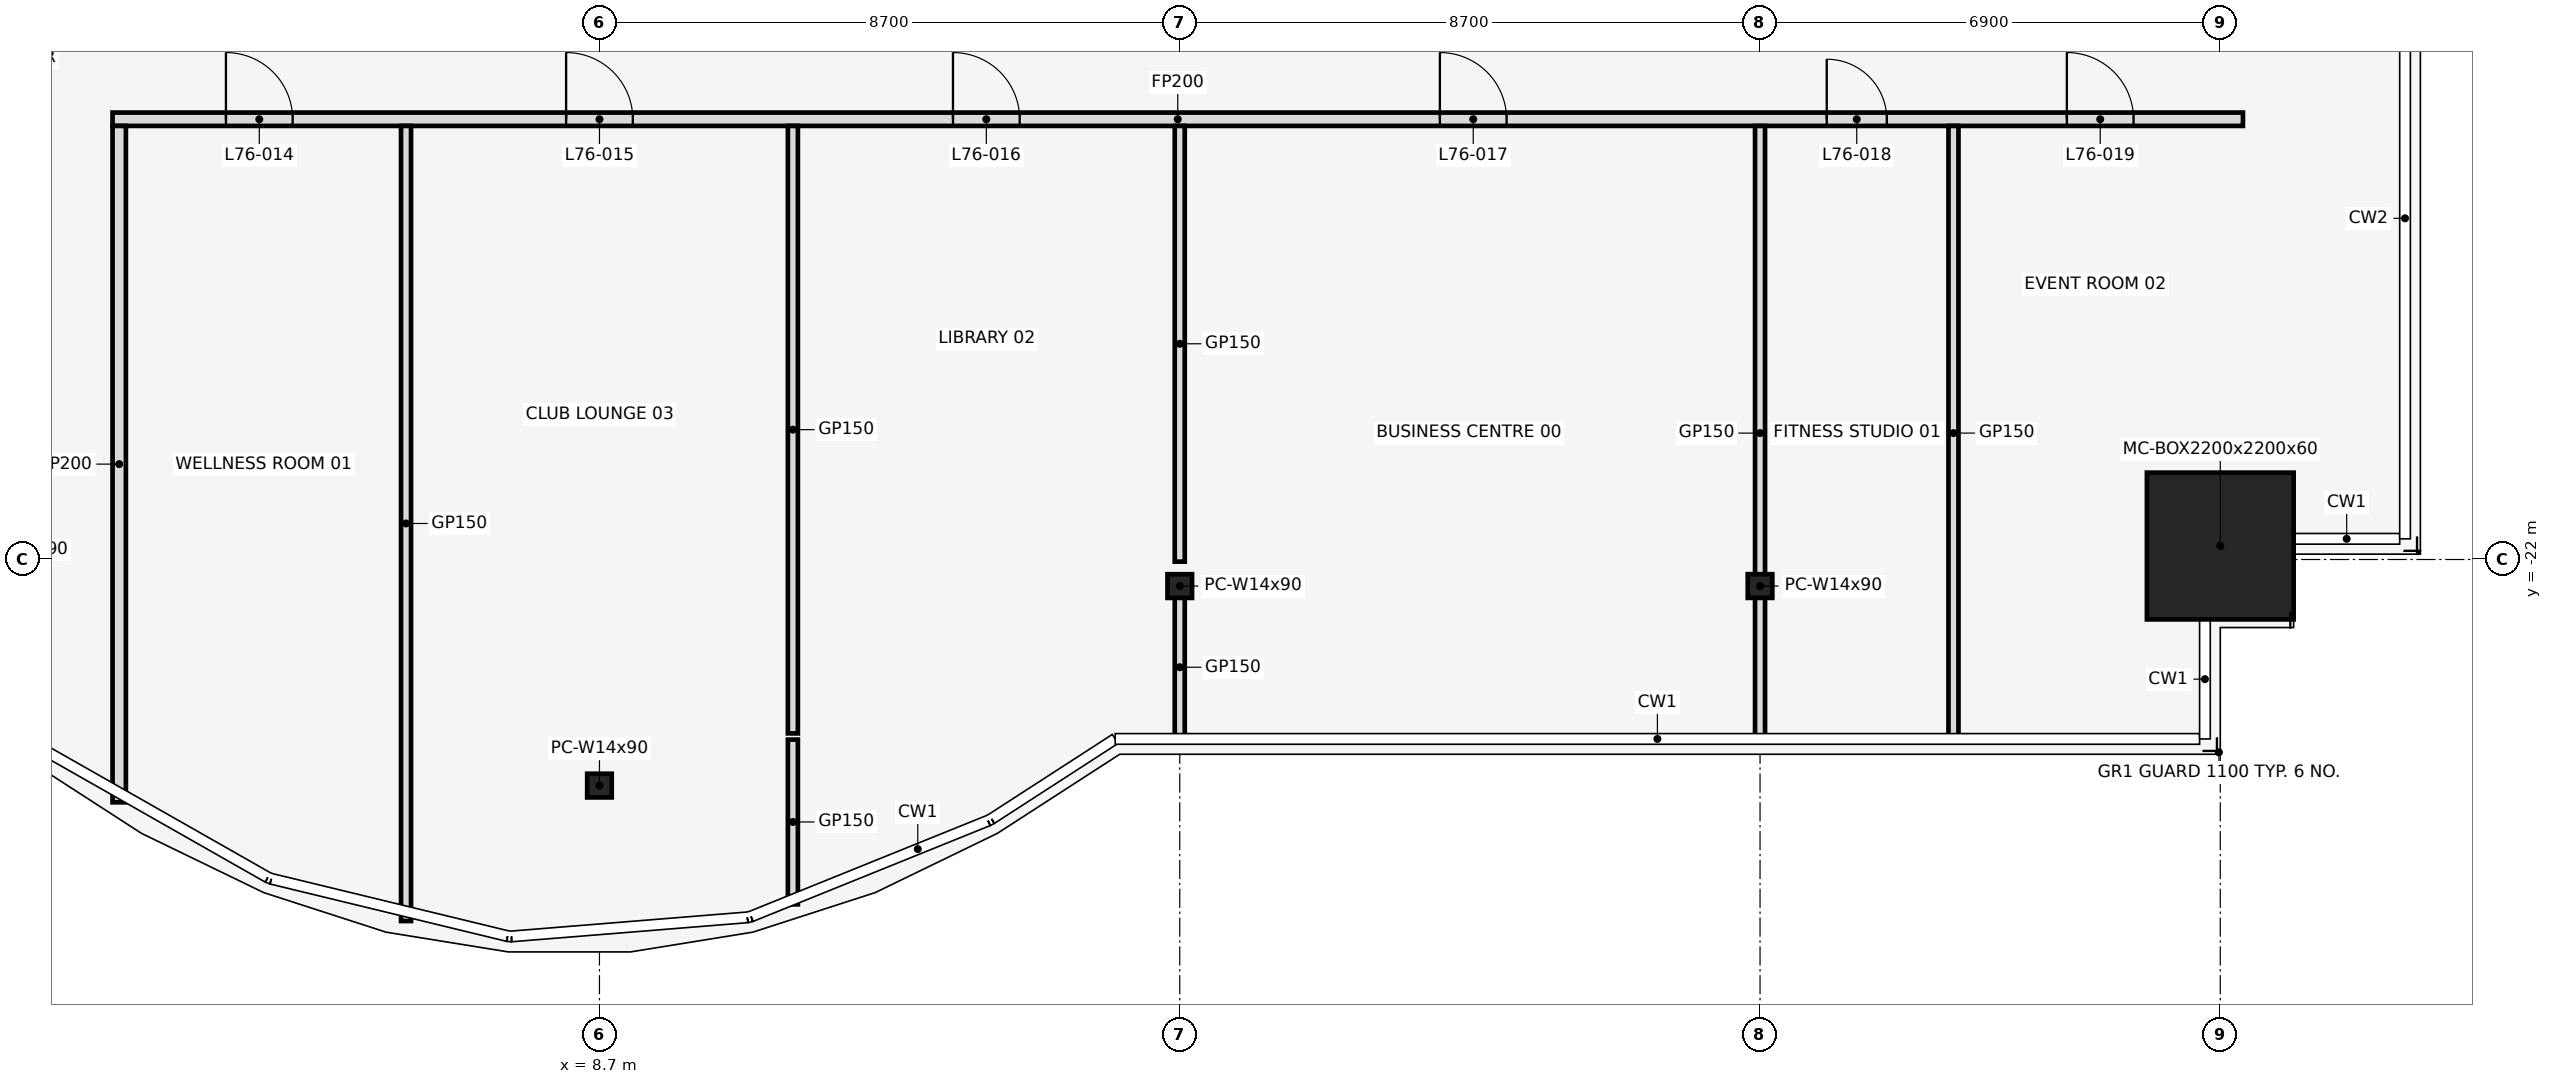
"""IFC4 building model, lengths in metres.
Left out: names, types, materials, properties, quantities, classifications, styles, units other than length and angle.
Written with IfcOpenShell. Run it as: python <this file> out.ifc"""

import sys

from ifc_helpers import new_model, si_unit, direction, frame, frame_2d, origin, origin_2d, place, context, subcontext, project, spatial, rectangle, hollow_rectangle, i_section, extrude, element, fill, save


model = new_model("IFC4")
c1 = context("Model", 3, precision=1e-05, world=origin(), true_north=direction((0.0, 1.0)))
c2 = subcontext(c1, "Body", "Model", "MODEL_VIEW")
j1 = project(units=[si_unit("LENGTHUNIT", "METRE"), si_unit("PLANEANGLEUNIT", "RADIAN")], contexts=[c1])
p1 = place(None, origin())
s1 = spatial("IfcSite", under=j1, at=p1, CompositionType="ELEMENT")
p2 = place(p1, origin())
s2 = spatial("IfcBuilding", under=s1, at=p2, CompositionType="ELEMENT")
p3 = place(p2, frame((0.0, 0.0, 338.0)))
s3 = spatial("IfcBuildingStorey", under=s2, at=p3, CompositionType="ELEMENT", Elevation=338.0)
for number, where, z_axis, x_axis in (
    (1, (8.7, -25.389, 0.0), (0.0, 0.0, 1.0), (1.0, 0.0, 0.0)),
    (2, (17.4, -22.398, 0.0), (0.0, 0.0, 1.0), (1.0, 0.0, 0.0)),
    (3, (26.1, -22.398, 0.0), (0.0, 0.0, 1.0), (1.0, 0.0, 0.0)),
):
    element("IfcColumn", number, at=place(p3, frame(where, z_axis=z_axis, x_axis=x_axis)), inside=s3, PredefinedType="COLUMN", context=c2, shape_type="SweptSolid", body=[
        extrude(i_section(OverallWidth=0.368, OverallDepth=0.356, WebThickness=0.011, FlangeThickness=0.018, at=origin_2d()), origin(), (0.0, 0.0, 1.0), 4.5),
    ])
p4 = place(p3, frame((33.0, -21.798, 0.0), z_axis=(0.0, 0.0, 1.0), x_axis=(1.0, 0.0, 0.0)))
e4 = element("IfcColumn", 4, at=p4, inside=s3, PredefinedType="COLUMN", context=c2, shape_type="SweptSolid", body=[
    extrude(hollow_rectangle(XDim=2.2, YDim=2.2, WallThickness=0.06, at=origin_2d()), origin(), (0.0, 0.0, 1.0), 4.5),
])
p5 = place(p3, frame((1.4, -15.4, 0.0), z_axis=(0.0, 0.0, 1.0), x_axis=(1.0, 0.0, 0.0)))
e5 = element("IfcWall", 5, at=p5, inside=s3, PredefinedType="PARTITIONING", context=c2, shape_type="SweptSolid", body=[
    extrude(rectangle(XDim=31.94, YDim=0.2, at=frame_2d((15.97, 0.0))), origin(), (0.0, 0.0, 1.0), 3.368),
])
p6 = place(p5, frame((1.7, 0.0, 0.0)))
e6 = element("IfcOpeningElement", 6, at=p6, cuts=e5, PredefinedType="OPENING", context=c2, shape_type="SweptSolid", body=[
    extrude(rectangle(XDim=1.0, YDim=2.1, at=frame_2d((0.5, 1.05))), frame((0.0, 0.112, 0.0), z_axis=(0.0, -1.0, 0.0), x_axis=(1.0, 0.0, 0.0)), (0.0, 0.0, 1.0), 0.224),
])
p7 = place(p5, frame((6.8, 0.0, 0.0)))
e7 = element("IfcOpeningElement", 7, at=p7, cuts=e5, PredefinedType="OPENING", context=c2, shape_type="SweptSolid", body=[
    extrude(rectangle(XDim=1.0, YDim=2.1, at=frame_2d((0.5, 1.05))), frame((0.0, 0.112, 0.0), z_axis=(0.0, -1.0, 0.0), x_axis=(1.0, 0.0, 0.0)), (0.0, 0.0, 1.0), 0.224),
])
p8 = place(p5, frame((12.6, 0.0, 0.0)))
e8 = element("IfcOpeningElement", 8, at=p8, cuts=e5, PredefinedType="OPENING", context=c2, shape_type="SweptSolid", body=[
    extrude(rectangle(XDim=1.0, YDim=2.1, at=frame_2d((0.5, 1.05))), frame((0.0, 0.112, 0.0), z_axis=(0.0, -1.0, 0.0), x_axis=(1.0, 0.0, 0.0)), (0.0, 0.0, 1.0), 0.224),
])
p9 = place(p5, frame((19.9, 0.0, 0.0)))
e9 = element("IfcOpeningElement", 9, at=p9, cuts=e5, PredefinedType="OPENING", context=c2, shape_type="SweptSolid", body=[
    extrude(rectangle(XDim=1.0, YDim=2.1, at=frame_2d((0.5, 1.05))), frame((0.0, 0.112, 0.0), z_axis=(0.0, -1.0, 0.0), x_axis=(1.0, 0.0, 0.0)), (0.0, 0.0, 1.0), 0.224),
])
p10 = place(p5, frame((25.7, 0.0, 0.0)))
e10 = element("IfcOpeningElement", 10, at=p10, cuts=e5, PredefinedType="OPENING", context=c2, shape_type="SweptSolid", body=[
    extrude(rectangle(XDim=0.9, YDim=2.1, at=frame_2d((0.45, 1.05))), frame((0.0, 0.112, 0.0), z_axis=(0.0, -1.0, 0.0), x_axis=(1.0, 0.0, 0.0)), (0.0, 0.0, 1.0), 0.224),
])
p11 = place(p5, frame((29.3, 0.0, 0.0)))
e11 = element("IfcOpeningElement", 11, at=p11, cuts=e5, PredefinedType="OPENING", context=c2, shape_type="SweptSolid", body=[
    extrude(rectangle(XDim=1.0, YDim=2.1, at=frame_2d((0.5, 1.05))), frame((0.0, 0.112, 0.0), z_axis=(0.0, -1.0, 0.0), x_axis=(1.0, 0.0, 0.0)), (0.0, 0.0, 1.0), 0.224),
])
p12 = place(p3, frame((1.5, -25.64, 0.0), z_axis=(0.0, 0.0, 1.0), x_axis=(0.0, 1.0, 0.0)))
e12 = element("IfcWall", 12, at=p12, inside=s3, PredefinedType="PARTITIONING", context=c2, shape_type="SweptSolid", body=[
    extrude(rectangle(XDim=10.14, YDim=0.2, at=frame_2d((5.07, 0.0))), origin(), (0.0, 0.0, 1.0), 3.368),
])
p13 = place(p3, frame((5.8, -27.42, 0.0), z_axis=(0.0, 0.0, 1.0), x_axis=(0.0, 1.0, 0.0)))
e13 = element("IfcWall", 13, at=p13, inside=s3, PredefinedType="PARTITIONING", context=c2, shape_type="SweptSolid", body=[
    extrude(rectangle(XDim=11.92, YDim=0.15, at=frame_2d((5.96, 0.0))), origin(), (0.0, 0.0, 1.0), 3.368),
])
p14 = place(p3, frame((11.6, -27.17, 0.0), z_axis=(0.0, 0.0, 1.0), x_axis=(0.0, 1.0, 0.0)))
e14 = element("IfcWall", 14, at=p14, inside=s3, PredefinedType="PARTITIONING", context=c2, shape_type="SweptSolid", body=[
    extrude(rectangle(XDim=2.47, YDim=0.15, at=frame_2d((1.235, 0.0))), origin(), (0.0, 0.0, 1.0), 3.368),
])
p15 = place(p3, frame((11.6, -24.607, 0.0), z_axis=(0.0, 0.0, 1.0), x_axis=(0.0, 1.0, 0.0)))
e15 = element("IfcWall", 15, at=p15, inside=s3, PredefinedType="PARTITIONING", context=c2, shape_type="SweptSolid", body=[
    extrude(rectangle(XDim=9.107, YDim=0.15, at=frame_2d((4.554, 0.0))), origin(), (0.0, 0.0, 1.0), 3.368),
])
p16 = place(p3, frame((17.4, -24.71, 0.0), z_axis=(0.0, 0.0, 1.0), x_axis=(0.0, 1.0, 0.0)))
e16 = element("IfcWall", 16, at=p16, inside=s3, PredefinedType="PARTITIONING", context=c2, shape_type="SweptSolid", body=[
    extrude(rectangle(XDim=2.19, YDim=0.15, at=frame_2d((1.095, 0.0))), origin(), (0.0, 0.0, 1.0), 3.368),
])
p17 = place(p3, frame((17.4, -22.032, 0.0), z_axis=(0.0, 0.0, 1.0), x_axis=(0.0, 1.0, 0.0)))
e17 = element("IfcWall", 17, at=p17, inside=s3, PredefinedType="PARTITIONING", context=c2, shape_type="SweptSolid", body=[
    extrude(rectangle(XDim=6.532, YDim=0.15, at=frame_2d((3.266, 0.0))), origin(), (0.0, 0.0, 1.0), 3.368),
])
for number, where, z_axis, x_axis in (
    (18, (26.1, -24.71, 0.0), (0.0, 0.0, 1.0), (0.0, 1.0, 0.0)),
    (19, (29.0, -24.71, 0.0), (0.0, 0.0, 1.0), (0.0, 1.0, 0.0)),
):
    element("IfcWall", number, at=place(p3, frame(where, z_axis=z_axis, x_axis=x_axis)), inside=s3, PredefinedType="PARTITIONING", context=c2, shape_type="SweptSolid", body=[
        extrude(rectangle(XDim=9.21, YDim=0.15, at=frame_2d((4.605, 0.0))), origin(), (0.0, 0.0, 1.0), 3.368),
    ])
p18 = place(p6, frame((1.0, 0.0, 0.0), z_axis=(0.0, 0.0, 1.0), x_axis=(-1.0, 0.0, 0.0)))
e20 = element("IfcDoor", 20, at=p18, inside=s3, OperationType="SINGLE_SWING_RIGHT", PredefinedType="DOOR", context=c2, shape_type="SweptSolid", body=[
    extrude(rectangle(XDim=1.0, YDim=2.1, at=frame_2d((0.5, 1.05))), frame((0.0, 0.025, 0.0), z_axis=(0.0, -1.0, 0.0), x_axis=(1.0, 0.0, 0.0)), (0.0, 0.0, 1.0), 0.05),
])
fill(e6, e20)
p19 = place(p7, frame((1.0, 0.0, 0.0), z_axis=(0.0, 0.0, 1.0), x_axis=(-1.0, 0.0, 0.0)))
e21 = element("IfcDoor", 21, at=p19, inside=s3, OperationType="SINGLE_SWING_RIGHT", PredefinedType="DOOR", context=c2, shape_type="SweptSolid", body=[
    extrude(rectangle(XDim=1.0, YDim=2.1, at=frame_2d((0.5, 1.05))), frame((0.0, 0.025, 0.0), z_axis=(0.0, -1.0, 0.0), x_axis=(1.0, 0.0, 0.0)), (0.0, 0.0, 1.0), 0.05),
])
fill(e7, e21)
p20 = place(p8, frame((1.0, 0.0, 0.0), z_axis=(0.0, 0.0, 1.0), x_axis=(-1.0, 0.0, 0.0)))
e22 = element("IfcDoor", 22, at=p20, inside=s3, OperationType="SINGLE_SWING_LEFT", PredefinedType="DOOR", context=c2, shape_type="SweptSolid", body=[
    extrude(rectangle(XDim=1.0, YDim=2.1, at=frame_2d((0.5, 1.05))), frame((0.0, 0.025, 0.0), z_axis=(0.0, -1.0, 0.0), x_axis=(1.0, 0.0, 0.0)), (0.0, 0.0, 1.0), 0.05),
])
fill(e8, e22)
p21 = place(p9, frame((1.0, 0.0, 0.0), z_axis=(0.0, 0.0, 1.0), x_axis=(-1.0, 0.0, 0.0)))
e23 = element("IfcDoor", 23, at=p21, inside=s3, OperationType="SINGLE_SWING_RIGHT", PredefinedType="DOOR", context=c2, shape_type="SweptSolid", body=[
    extrude(rectangle(XDim=1.0, YDim=2.1, at=frame_2d((0.5, 1.05))), frame((0.0, 0.025, 0.0), z_axis=(0.0, -1.0, 0.0), x_axis=(1.0, 0.0, 0.0)), (0.0, 0.0, 1.0), 0.05),
])
fill(e9, e23)
p22 = place(p10, frame((0.9, 0.0, 0.0), z_axis=(0.0, 0.0, 1.0), x_axis=(-1.0, 0.0, 0.0)))
e24 = element("IfcDoor", 24, at=p22, inside=s3, OperationType="SINGLE_SWING_RIGHT", PredefinedType="DOOR", context=c2, shape_type="SweptSolid", body=[
    extrude(rectangle(XDim=0.9, YDim=2.1, at=frame_2d((0.45, 1.05))), frame((0.0, 0.025, 0.0), z_axis=(0.0, -1.0, 0.0), x_axis=(1.0, 0.0, 0.0)), (0.0, 0.0, 1.0), 0.05),
])
fill(e10, e24)
p23 = place(p11, frame((1.0, 0.0, 0.0), z_axis=(0.0, 0.0, 1.0), x_axis=(-1.0, 0.0, 0.0)))
e25 = element("IfcDoor", 25, at=p23, inside=s3, OperationType="SINGLE_SWING_LEFT", PredefinedType="DOOR", context=c2, shape_type="SweptSolid", body=[
    extrude(rectangle(XDim=1.0, YDim=2.1, at=frame_2d((0.5, 1.05))), frame((0.0, 0.025, 0.0), z_axis=(0.0, -1.0, 0.0), x_axis=(1.0, 0.0, 0.0)), (0.0, 0.0, 1.0), 0.05),
])
fill(e11, e25)
save(model, sys.argv[1])
